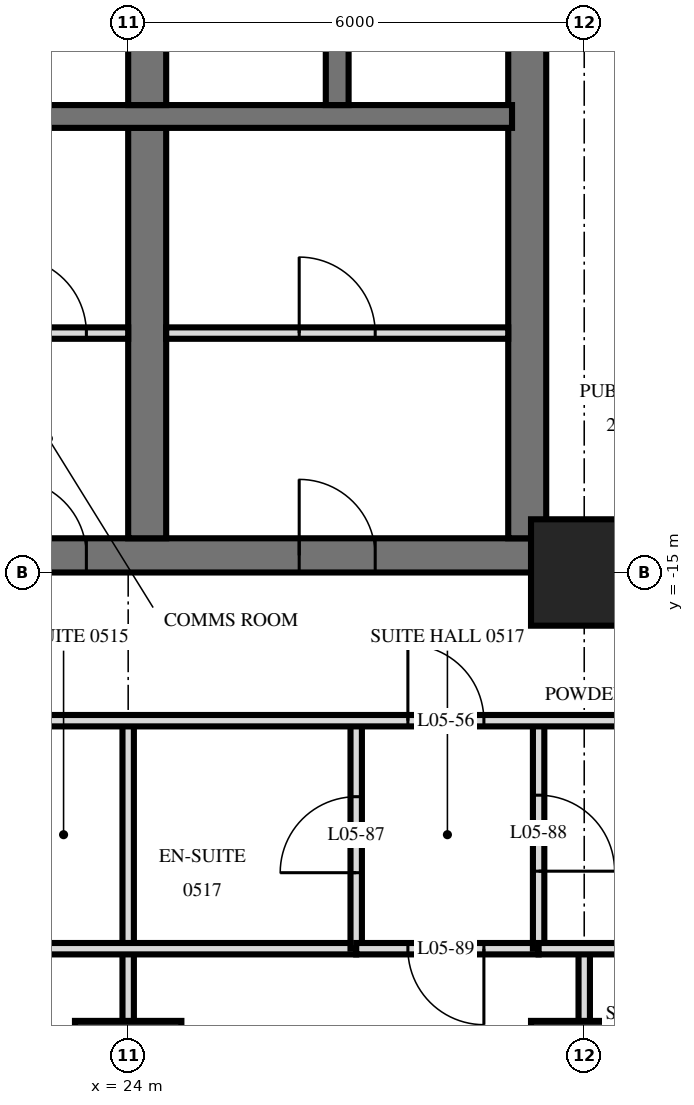
"""IFC4 building model, lengths in metres.
Left out: names, types, materials, properties, quantities, classifications, styles, units other than length and angle.
Written with IfcOpenShell. Run it as: python <this file> out.ifc"""

import sys

from ifc_helpers import new_model, si_unit, direction, frame, frame_2d, origin, origin_2d, place, context, subcontext, project, spatial, rectangle, extrude, element, fill, save


model = new_model("IFC4")
c1 = context("Model", 3, precision=1e-05, world=origin(), true_north=direction((0.0, 1.0)))
c2 = subcontext(c1, "Body", "Model", "MODEL_VIEW")
j1 = project(units=[si_unit("LENGTHUNIT", "METRE"), si_unit("PLANEANGLEUNIT", "RADIAN")], contexts=[c1])
p1 = place(None, origin())
s1 = spatial("IfcSite", under=j1, at=p1, CompositionType="ELEMENT")
p2 = place(p1, origin())
s2 = spatial("IfcBuilding", under=s1, at=p2, CompositionType="ELEMENT")
p3 = place(p2, frame((0.0, 0.0, 27.6)))
s3 = spatial("IfcBuildingStorey", under=s2, at=p3, CompositionType="ELEMENT", Elevation=27.6)
for number, where, z_axis, x_axis in (
    (1, (24.0, -21.6, 0.0), (0.0, 0.0, 1.0), (1.0, 0.0, 0.0)),
    (2, (30.0, -21.6, 0.0), (0.0, 0.0, 1.0), (1.0, 0.0, 0.0)),
    (3, (30.0, -15.0, 0.0), (0.0, 0.0, 1.0), (1.0, 0.0, 0.0)),
):
    element("IfcColumn", number, at=place(p3, frame(where, z_axis=z_axis, x_axis=x_axis)), inside=s3, PredefinedType="COLUMN", context=c2, shape_type="SweptSolid", body=[
        extrude(rectangle(XDim=1.4, YDim=1.4, at=origin_2d()), origin(), (0.0, 0.0, 1.0), 3.6),
    ])
p4 = place(p3, frame((10.0, -14.775, 0.0), z_axis=(0.0, 0.0, 1.0), x_axis=(1.0, 0.0, 0.0)))
e4 = element("IfcWall", 4, at=p4, inside=s3, PredefinedType="SHEAR", context=c2, shape_type="SweptSolid", body=[
    extrude(rectangle(XDim=19.5, YDim=0.45, at=frame_2d((9.75, 0.0))), origin(), (0.0, 0.0, 1.0), 3.6),
])
p5 = place(p4, frame((7.1, 0.0, 0.0)))
e5 = element("IfcOpeningElement", 5, at=p5, cuts=e4, PredefinedType="OPENING", context=c2, shape_type="SweptSolid", body=[
    extrude(rectangle(XDim=1.2, YDim=2.1, at=frame_2d((0.6, 1.05))), frame((0.0, 0.235, 0.0), z_axis=(0.0, -1.0, 0.0), x_axis=(1.0, 0.0, 0.0)), (0.0, 0.0, 1.0), 0.47),
])
p6 = place(p4, frame((4.15, 0.0, 0.0)))
e6 = element("IfcOpeningElement", 6, at=p6, cuts=e4, PredefinedType="OPENING", context=c2, shape_type="SweptSolid", body=[
    extrude(rectangle(XDim=1.1, YDim=2.1, at=frame_2d((0.55, 1.05))), frame((0.0, 0.235, 0.0), z_axis=(0.0, -1.0, 0.0), x_axis=(1.0, 0.0, 0.0)), (0.0, 0.0, 1.0), 0.47),
])
p7 = place(p4, frame((10.1, 0.0, 0.0)))
e7 = element("IfcOpeningElement", 7, at=p7, cuts=e4, PredefinedType="OPENING", context=c2, shape_type="SweptSolid", body=[
    extrude(rectangle(XDim=0.9, YDim=2.1, at=frame_2d((0.45, 1.05))), frame((0.0, 0.235, 0.0), z_axis=(0.0, -1.0, 0.0), x_axis=(1.0, 0.0, 0.0)), (0.0, 0.0, 1.0), 0.47),
])
p8 = place(p4, frame((12.45, 0.0, 0.0)))
e8 = element("IfcOpeningElement", 8, at=p8, cuts=e4, PredefinedType="OPENING", context=c2, shape_type="SweptSolid", body=[
    extrude(rectangle(XDim=1.0, YDim=2.1, at=frame_2d((0.5, 1.05))), frame((0.0, 0.235, 0.0), z_axis=(0.0, -1.0, 0.0), x_axis=(1.0, 0.0, 0.0)), (0.0, 0.0, 1.0), 0.47),
])
p9 = place(p4, frame((16.25, 0.0, 0.0)))
e9 = element("IfcOpeningElement", 9, at=p9, cuts=e4, PredefinedType="OPENING", context=c2, shape_type="SweptSolid", body=[
    extrude(rectangle(XDim=1.0, YDim=2.1, at=frame_2d((0.5, 1.05))), frame((0.0, 0.235, 0.0), z_axis=(0.0, -1.0, 0.0), x_axis=(1.0, 0.0, 0.0)), (0.0, 0.0, 1.0), 0.47),
])
p10 = place(p3, frame((29.25, -14.55, 0.0), z_axis=(0.0, 0.0, 1.0), x_axis=(0.0, 1.0, 0.0)))
e10 = element("IfcWall", 10, at=p10, inside=s3, PredefinedType="SHEAR", context=c2, shape_type="SweptSolid", body=[
    extrude(rectangle(XDim=14.1, YDim=0.5, at=frame_2d((7.05, 0.0))), origin(), (0.0, 0.0, 1.0), 3.6),
])
p11 = place(p3, frame((10.35, -9.0, 0.0), z_axis=(0.0, 0.0, 1.0), x_axis=(1.0, 0.0, 0.0)))
e11 = element("IfcWall", 11, at=p11, inside=s3, PredefinedType="SHEAR", context=c2, shape_type="SweptSolid", body=[
    extrude(rectangle(XDim=18.7, YDim=0.3, at=frame_2d((9.35, 0.0))), origin(), (0.0, 0.0, 1.0), 3.6),
])
p12 = place(p11, frame((3.8, 0.0, 0.0)))
e12 = element("IfcOpeningElement", 12, at=p12, cuts=e11, PredefinedType="OPENING", context=c2, shape_type="SweptSolid", body=[
    extrude(rectangle(XDim=1.1, YDim=2.1, at=frame_2d((0.55, 1.05))), frame((0.0, 0.16, 0.0), z_axis=(0.0, -1.0, 0.0), x_axis=(1.0, 0.0, 0.0)), (0.0, 0.0, 1.0), 0.32),
])
p13 = place(p3, frame((24.25, -8.85, 0.0), z_axis=(0.0, 0.0, 1.0), x_axis=(0.0, 1.0, 0.0)))
e13 = element("IfcWall", 13, at=p13, inside=s3, PredefinedType="SHEAR", context=c2, shape_type="SweptSolid", body=[
    extrude(rectangle(XDim=2.3, YDim=0.5, at=frame_2d((1.15, 0.0))), origin(), (0.0, 0.0, 1.0), 3.6),
])
p14 = place(p3, frame((24.25, -14.55, 0.0), z_axis=(0.0, 0.0, 1.0), x_axis=(0.0, 1.0, 0.0)))
e14 = element("IfcWall", 14, at=p14, inside=s3, PredefinedType="SHEAR", context=c2, shape_type="SweptSolid", body=[
    extrude(rectangle(XDim=5.4, YDim=0.5, at=frame_2d((2.7, 0.0))), origin(), (0.0, 0.0, 1.0), 3.6),
])
p15 = place(p3, frame((26.75, -8.85, 0.0), z_axis=(0.0, 0.0, 1.0), x_axis=(0.0, 1.0, 0.0)))
e15 = element("IfcWall", 15, at=p15, inside=s3, PredefinedType="SHEAR", context=c2, shape_type="SweptSolid", body=[
    extrude(rectangle(XDim=2.3, YDim=0.3, at=frame_2d((1.15, 0.0))), origin(), (0.0, 0.0, 1.0), 3.6),
])
p16 = place(p3, frame((21.9, -11.85, 0.0), z_axis=(0.0, 0.0, 1.0), x_axis=(1.0, 0.0, 0.0)))
e16 = element("IfcWall", 16, at=p16, inside=s3, PredefinedType="PARTITIONING", context=c2, shape_type="SweptSolid", body=[
    extrude(rectangle(XDim=2.1, YDim=0.15, at=frame_2d((1.05, 0.0))), origin(), (0.0, 0.0, 1.0), 3.3),
])
p17 = place(p16, frame((0.55, 0.0, 0.0)))
e17 = element("IfcOpeningElement", 17, at=p17, cuts=e16, PredefinedType="OPENING", context=c2, shape_type="SweptSolid", body=[
    extrude(rectangle(XDim=1.0, YDim=2.1, at=frame_2d((0.5, 1.05))), frame((0.0, 0.085, 0.0), z_axis=(0.0, -1.0, 0.0), x_axis=(1.0, 0.0, 0.0)), (0.0, 0.0, 1.0), 0.17),
])
p18 = place(p3, frame((24.5, -11.85, 0.0), z_axis=(0.0, 0.0, 1.0), x_axis=(1.0, 0.0, 0.0)))
e18 = element("IfcWall", 18, at=p18, inside=s3, PredefinedType="PARTITIONING", context=c2, shape_type="SweptSolid", body=[
    extrude(rectangle(XDim=4.5, YDim=0.15, at=frame_2d((2.25, 0.0))), origin(), (0.0, 0.0, 1.0), 3.3),
])
p19 = place(p18, frame((1.75, 0.0, 0.0)))
e19 = element("IfcOpeningElement", 19, at=p19, cuts=e18, PredefinedType="OPENING", context=c2, shape_type="SweptSolid", body=[
    extrude(rectangle(XDim=1.0, YDim=2.1, at=frame_2d((0.5, 1.05))), frame((0.0, 0.085, 0.0), z_axis=(0.0, -1.0, 0.0), x_axis=(1.0, 0.0, 0.0)), (0.0, 0.0, 1.0), 0.17),
])
p20 = place(p3, frame((30.0, -28.978, 0.0), z_axis=(0.0, 0.0, 1.0), x_axis=(0.0, 1.0, 0.0)))
e20 = element("IfcWall", 20, at=p20, inside=s3, PredefinedType="PARTITIONING", context=c2, shape_type="SweptSolid", body=[
    extrude(rectangle(XDim=9.028, YDim=0.15, at=frame_2d((4.514, 0.0))), origin(), (0.0, 0.0, 1.0), 3.32),
])
p21 = place(p20, frame((3.958, 0.0, 0.0)))
e21 = element("IfcOpeningElement", 21, at=p21, cuts=e20, PredefinedType="OPENING", context=c2, shape_type="SweptSolid", body=[
    extrude(rectangle(XDim=0.9, YDim=2.1, at=frame_2d((0.45, 1.05))), frame((0.0, 0.085, 0.0), z_axis=(0.0, -1.0, 0.0), x_axis=(1.0, 0.0, 0.0)), (0.0, 0.0, 1.0), 0.17),
])
p22 = place(p3, frame((29.4, -19.95, 0.0), z_axis=(0.0, 0.0, 1.0), x_axis=(0.0, 1.0, 0.0)))
e22 = element("IfcWall", 22, at=p22, inside=s3, PredefinedType="PARTITIONING", context=c2, shape_type="SweptSolid", body=[
    extrude(rectangle(XDim=3.0, YDim=0.15, at=frame_2d((1.5, 0.0))), origin(), (0.0, 0.0, 1.0), 3.32),
])
p23 = place(p22, frame((1.02, 0.0, 0.0)))
e23 = element("IfcOpeningElement", 23, at=p23, cuts=e22, PredefinedType="OPENING", context=c2, shape_type="SweptSolid", body=[
    extrude(rectangle(XDim=1.0, YDim=2.1, at=frame_2d((0.5, 1.05))), frame((0.0, 0.085, 0.0), z_axis=(0.0, -1.0, 0.0), x_axis=(1.0, 0.0, 0.0)), (0.0, 0.0, 1.0), 0.17),
])
p24 = place(p3, frame((27.0, -19.95, 0.0), z_axis=(0.0, 0.0, 1.0), x_axis=(0.0, 1.0, 0.0)))
e24 = element("IfcWall", 24, at=p24, inside=s3, PredefinedType="PARTITIONING", context=c2, shape_type="SweptSolid", body=[
    extrude(rectangle(XDim=3.0, YDim=0.15, at=frame_2d((1.5, 0.0))), origin(), (0.0, 0.0, 1.0), 3.32),
])
p25 = place(p24, frame((1.0, 0.0, 0.0)))
e25 = element("IfcOpeningElement", 25, at=p25, cuts=e24, PredefinedType="OPENING", context=c2, shape_type="SweptSolid", body=[
    extrude(rectangle(XDim=1.0, YDim=2.1, at=frame_2d((0.5, 1.05))), frame((0.0, 0.085, 0.0), z_axis=(0.0, -1.0, 0.0), x_axis=(1.0, 0.0, 0.0)), (0.0, 0.0, 1.0), 0.17),
])
p26 = place(p3, frame((24.0, -29.22, 0.0), z_axis=(0.0, 0.0, 1.0), x_axis=(0.0, 1.0, 0.0)))
e26 = element("IfcWall", 26, at=p26, inside=s3, PredefinedType="PARTITIONING", context=c2, shape_type="SweptSolid", body=[
    extrude(rectangle(XDim=12.27, YDim=0.15, at=frame_2d((6.135, 0.0))), origin(), (0.0, 0.0, 1.0), 3.32),
])
p27 = place(p3, frame((27.0, -19.95, 0.0), z_axis=(0.0, 0.0, 1.0), x_axis=(1.0, 0.0, 0.0)))
e27 = element("IfcWall", 27, at=p27, inside=s3, PredefinedType="PARTITIONING", context=c2, shape_type="SweptSolid", body=[
    extrude(rectangle(XDim=2.4, YDim=0.15, at=frame_2d((1.2, 0.0))), origin(), (0.0, 0.0, 1.0), 3.32),
])
p28 = place(p27, frame((0.68, 0.0, 0.0)))
e28 = element("IfcOpeningElement", 28, at=p28, cuts=e27, PredefinedType="OPENING", context=c2, shape_type="SweptSolid", body=[
    extrude(rectangle(XDim=1.0, YDim=2.1, at=frame_2d((0.5, 1.05))), frame((0.0, 0.085, 0.0), z_axis=(0.0, -1.0, 0.0), x_axis=(1.0, 0.0, 0.0)), (0.0, 0.0, 1.0), 0.17),
])
p29 = place(p3, frame((22.3, -19.95, 0.0), z_axis=(0.0, 0.0, 1.0), x_axis=(1.0, 0.0, 0.0)))
e29 = element("IfcWall", 29, at=p29, inside=s3, PredefinedType="PARTITIONING", context=c2, shape_type="SweptSolid", body=[
    extrude(rectangle(XDim=4.7, YDim=0.15, at=frame_2d((2.35, 0.0))), origin(), (0.0, 0.0, 1.0), 3.32),
])
p30 = place(p3, frame((29.4, -19.95, 0.0), z_axis=(0.0, 0.0, 1.0), x_axis=(1.0, 0.0, 0.0)))
e30 = element("IfcWall", 30, at=p30, inside=s3, PredefinedType="PARTITIONING", context=c2, shape_type="SweptSolid", body=[
    extrude(rectangle(XDim=2.4, YDim=0.15, at=frame_2d((1.2, 0.0))), origin(), (0.0, 0.0, 1.0), 3.32),
])
p31 = place(p3, frame((-33.12, -16.95, 0.0), z_axis=(0.0, 0.0, 1.0), x_axis=(1.0, 0.0, 0.0)))
e31 = element("IfcWall", 31, at=p31, inside=s3, PredefinedType="PARTITIONING", context=c2, shape_type="SweptSolid", body=[
    extrude(rectangle(XDim=66.24, YDim=0.15, at=frame_2d((33.12, 0.0))), origin(), (0.0, 0.0, 1.0), 3.32),
])
p32 = place(p31, frame((9.27, 0.0, 0.0)))
e32 = element("IfcOpeningElement", 32, at=p32, cuts=e31, PredefinedType="OPENING", context=c2, shape_type="SweptSolid", body=[
    extrude(rectangle(XDim=1.0, YDim=2.1, at=frame_2d((0.5, 1.05))), frame((0.0, 0.085, 0.0), z_axis=(0.0, -1.0, 0.0), x_axis=(1.0, 0.0, 0.0)), (0.0, 0.0, 1.0), 0.17),
])
p33 = place(p31, frame((13.97, 0.0, 0.0)))
e33 = element("IfcOpeningElement", 33, at=p33, cuts=e31, PredefinedType="OPENING", context=c2, shape_type="SweptSolid", body=[
    extrude(rectangle(XDim=1.0, YDim=2.1, at=frame_2d((0.5, 1.05))), frame((0.0, 0.085, 0.0), z_axis=(0.0, -1.0, 0.0), x_axis=(1.0, 0.0, 0.0)), (0.0, 0.0, 1.0), 0.17),
])
p34 = place(p31, frame((15.27, 0.0, 0.0)))
e34 = element("IfcOpeningElement", 34, at=p34, cuts=e31, PredefinedType="OPENING", context=c2, shape_type="SweptSolid", body=[
    extrude(rectangle(XDim=1.0, YDim=2.1, at=frame_2d((0.5, 1.05))), frame((0.0, 0.085, 0.0), z_axis=(0.0, -1.0, 0.0), x_axis=(1.0, 0.0, 0.0)), (0.0, 0.0, 1.0), 0.17),
])
p35 = place(p31, frame((19.97, 0.0, 0.0)))
e35 = element("IfcOpeningElement", 35, at=p35, cuts=e31, PredefinedType="OPENING", context=c2, shape_type="SweptSolid", body=[
    extrude(rectangle(XDim=1.0, YDim=2.1, at=frame_2d((0.5, 1.05))), frame((0.0, 0.085, 0.0), z_axis=(0.0, -1.0, 0.0), x_axis=(1.0, 0.0, 0.0)), (0.0, 0.0, 1.0), 0.17),
])
p36 = place(p31, frame((22.27, 0.0, 0.0)))
e36 = element("IfcOpeningElement", 36, at=p36, cuts=e31, PredefinedType="OPENING", context=c2, shape_type="SweptSolid", body=[
    extrude(rectangle(XDim=1.0, YDim=2.1, at=frame_2d((0.5, 1.05))), frame((0.0, 0.085, 0.0), z_axis=(0.0, -1.0, 0.0), x_axis=(1.0, 0.0, 0.0)), (0.0, 0.0, 1.0), 0.17),
])
p37 = place(p31, frame((28.97, 0.0, 0.0)))
e37 = element("IfcOpeningElement", 37, at=p37, cuts=e31, PredefinedType="OPENING", context=c2, shape_type="SweptSolid", body=[
    extrude(rectangle(XDim=1.0, YDim=2.1, at=frame_2d((0.5, 1.05))), frame((0.0, 0.085, 0.0), z_axis=(0.0, -1.0, 0.0), x_axis=(1.0, 0.0, 0.0)), (0.0, 0.0, 1.0), 0.17),
])
p38 = place(p31, frame((30.27, 0.0, 0.0)))
e38 = element("IfcOpeningElement", 38, at=p38, cuts=e31, PredefinedType="OPENING", context=c2, shape_type="SweptSolid", body=[
    extrude(rectangle(XDim=1.0, YDim=2.1, at=frame_2d((0.5, 1.05))), frame((0.0, 0.085, 0.0), z_axis=(0.0, -1.0, 0.0), x_axis=(1.0, 0.0, 0.0)), (0.0, 0.0, 1.0), 0.17),
])
p39 = place(p31, frame((34.97, 0.0, 0.0)))
e39 = element("IfcOpeningElement", 39, at=p39, cuts=e31, PredefinedType="OPENING", context=c2, shape_type="SweptSolid", body=[
    extrude(rectangle(XDim=1.0, YDim=2.1, at=frame_2d((0.5, 1.05))), frame((0.0, 0.085, 0.0), z_axis=(0.0, -1.0, 0.0), x_axis=(1.0, 0.0, 0.0)), (0.0, 0.0, 1.0), 0.17),
])
p40 = place(p31, frame((36.27, 0.0, 0.0)))
e40 = element("IfcOpeningElement", 40, at=p40, cuts=e31, PredefinedType="OPENING", context=c2, shape_type="SweptSolid", body=[
    extrude(rectangle(XDim=1.0, YDim=2.1, at=frame_2d((0.5, 1.05))), frame((0.0, 0.085, 0.0), z_axis=(0.0, -1.0, 0.0), x_axis=(1.0, 0.0, 0.0)), (0.0, 0.0, 1.0), 0.17),
])
p41 = place(p31, frame((40.97, 0.0, 0.0)))
e41 = element("IfcOpeningElement", 41, at=p41, cuts=e31, PredefinedType="OPENING", context=c2, shape_type="SweptSolid", body=[
    extrude(rectangle(XDim=1.0, YDim=2.1, at=frame_2d((0.5, 1.05))), frame((0.0, 0.085, 0.0), z_axis=(0.0, -1.0, 0.0), x_axis=(1.0, 0.0, 0.0)), (0.0, 0.0, 1.0), 0.17),
])
p42 = place(p31, frame((42.27, 0.0, 0.0)))
e42 = element("IfcOpeningElement", 42, at=p42, cuts=e31, PredefinedType="OPENING", context=c2, shape_type="SweptSolid", body=[
    extrude(rectangle(XDim=1.0, YDim=2.1, at=frame_2d((0.5, 1.05))), frame((0.0, 0.085, 0.0), z_axis=(0.0, -1.0, 0.0), x_axis=(1.0, 0.0, 0.0)), (0.0, 0.0, 1.0), 0.17),
])
p43 = place(p31, frame((46.97, 0.0, 0.0)))
e43 = element("IfcOpeningElement", 43, at=p43, cuts=e31, PredefinedType="OPENING", context=c2, shape_type="SweptSolid", body=[
    extrude(rectangle(XDim=1.0, YDim=2.1, at=frame_2d((0.5, 1.05))), frame((0.0, 0.085, 0.0), z_axis=(0.0, -1.0, 0.0), x_axis=(1.0, 0.0, 0.0)), (0.0, 0.0, 1.0), 0.17),
])
p44 = place(p31, frame((48.27, 0.0, 0.0)))
e44 = element("IfcOpeningElement", 44, at=p44, cuts=e31, PredefinedType="OPENING", context=c2, shape_type="SweptSolid", body=[
    extrude(rectangle(XDim=1.0, YDim=2.1, at=frame_2d((0.5, 1.05))), frame((0.0, 0.085, 0.0), z_axis=(0.0, -1.0, 0.0), x_axis=(1.0, 0.0, 0.0)), (0.0, 0.0, 1.0), 0.17),
])
p45 = place(p31, frame((52.97, 0.0, 0.0)))
e45 = element("IfcOpeningElement", 45, at=p45, cuts=e31, PredefinedType="OPENING", context=c2, shape_type="SweptSolid", body=[
    extrude(rectangle(XDim=1.0, YDim=2.1, at=frame_2d((0.5, 1.05))), frame((0.0, 0.085, 0.0), z_axis=(0.0, -1.0, 0.0), x_axis=(1.0, 0.0, 0.0)), (0.0, 0.0, 1.0), 0.17),
])
p46 = place(p31, frame((54.27, 0.0, 0.0)))
e46 = element("IfcOpeningElement", 46, at=p46, cuts=e31, PredefinedType="OPENING", context=c2, shape_type="SweptSolid", body=[
    extrude(rectangle(XDim=1.0, YDim=2.1, at=frame_2d((0.5, 1.05))), frame((0.0, 0.085, 0.0), z_axis=(0.0, -1.0, 0.0), x_axis=(1.0, 0.0, 0.0)), (0.0, 0.0, 1.0), 0.17),
])
p47 = place(p31, frame((4.4, 0.0, 0.0)))
e47 = element("IfcOpeningElement", 47, at=p47, cuts=e31, PredefinedType="OPENING", context=c2, shape_type="SweptSolid", body=[
    extrude(rectangle(XDim=1.0, YDim=2.1, at=frame_2d((0.5, 1.05))), frame((0.0, 0.085, 0.0), z_axis=(0.0, -1.0, 0.0), x_axis=(1.0, 0.0, 0.0)), (0.0, 0.0, 1.0), 0.17),
])
p48 = place(p31, frame((60.8, 0.0, 0.0)))
e48 = element("IfcOpeningElement", 48, at=p48, cuts=e31, PredefinedType="OPENING", context=c2, shape_type="SweptSolid", body=[
    extrude(rectangle(XDim=1.0, YDim=2.1, at=frame_2d((0.5, 1.05))), frame((0.0, 0.085, 0.0), z_axis=(0.0, -1.0, 0.0), x_axis=(1.0, 0.0, 0.0)), (0.0, 0.0, 1.0), 0.17),
])
p49 = place(p3, frame((29.55, -15.0, 0.0), z_axis=(0.0, 0.0, 1.0), x_axis=(1.0, 0.0, 0.0)))
e49 = element("IfcWall", 49, at=p49, inside=s3, PredefinedType="PARTITIONING", context=c2, shape_type="SweptSolid", body=[
    extrude(rectangle(XDim=3.57, YDim=0.15, at=frame_2d((1.785, 0.0))), origin(), (0.0, 0.0, 1.0), 3.32),
])
p50 = place(p49, frame((1.205, 0.0, 0.0)))
e50 = element("IfcOpeningElement", 50, at=p50, cuts=e49, PredefinedType="OPENING", context=c2, shape_type="SweptSolid", body=[
    extrude(rectangle(XDim=0.8, YDim=2.1, at=frame_2d((0.4, 1.05))), frame((0.0, 0.085, 0.0), z_axis=(0.0, -1.0, 0.0), x_axis=(1.0, 0.0, 0.0)), (0.0, 0.0, 1.0), 0.17),
])
p51 = place(p8, origin())
e51 = element("IfcDoor", 51, at=p51, inside=s3, OperationType="SINGLE_SWING_RIGHT", PredefinedType="DOOR", context=c2, shape_type="SweptSolid", body=[
    extrude(rectangle(XDim=1.0, YDim=2.1, at=frame_2d((0.5, 1.05))), frame((0.0, 0.025, 0.0), z_axis=(0.0, -1.0, 0.0), x_axis=(1.0, 0.0, 0.0)), (0.0, 0.0, 1.0), 0.05),
])
fill(e8, e51)
p52 = place(p9, origin())
e52 = element("IfcDoor", 52, at=p52, inside=s3, OperationType="SINGLE_SWING_RIGHT", PredefinedType="DOOR", context=c2, shape_type="SweptSolid", body=[
    extrude(rectangle(XDim=1.0, YDim=2.1, at=frame_2d((0.5, 1.05))), frame((0.0, 0.025, 0.0), z_axis=(0.0, -1.0, 0.0), x_axis=(1.0, 0.0, 0.0)), (0.0, 0.0, 1.0), 0.05),
])
fill(e9, e52)
p53 = place(p17, origin())
e53 = element("IfcDoor", 53, at=p53, inside=s3, OperationType="SINGLE_SWING_RIGHT", PredefinedType="DOOR", context=c2, shape_type="SweptSolid", body=[
    extrude(rectangle(XDim=1.0, YDim=2.1, at=frame_2d((0.5, 1.05))), frame((0.0, 0.025, 0.0), z_axis=(0.0, -1.0, 0.0), x_axis=(1.0, 0.0, 0.0)), (0.0, 0.0, 1.0), 0.05),
])
fill(e17, e53)
p54 = place(p19, origin())
e54 = element("IfcDoor", 54, at=p54, inside=s3, OperationType="SINGLE_SWING_RIGHT", PredefinedType="DOOR", context=c2, shape_type="SweptSolid", body=[
    extrude(rectangle(XDim=1.0, YDim=2.1, at=frame_2d((0.5, 1.05))), frame((0.0, 0.025, 0.0), z_axis=(0.0, -1.0, 0.0), x_axis=(1.0, 0.0, 0.0)), (0.0, 0.0, 1.0), 0.05),
])
fill(e19, e54)
p55 = place(p48, origin())
e55 = element("IfcDoor", 55, at=p55, inside=s3, OperationType="SINGLE_SWING_RIGHT", PredefinedType="DOOR", context=c2, shape_type="SweptSolid", body=[
    extrude(rectangle(XDim=1.0, YDim=2.1, at=frame_2d((0.5, 1.05))), frame((0.0, 0.025, 0.0), z_axis=(0.0, -1.0, 0.0), x_axis=(1.0, 0.0, 0.0)), (0.0, 0.0, 1.0), 0.05),
])
fill(e48, e55)
p56 = place(p25, origin())
e56 = element("IfcDoor", 56, at=p56, inside=s3, OperationType="SINGLE_SWING_RIGHT", PredefinedType="DOOR", context=c2, shape_type="SweptSolid", body=[
    extrude(rectangle(XDim=1.0, YDim=2.1, at=frame_2d((0.5, 1.05))), frame((0.0, 0.025, 0.0), z_axis=(0.0, -1.0, 0.0), x_axis=(1.0, 0.0, 0.0)), (0.0, 0.0, 1.0), 0.05),
])
fill(e25, e56)
p57 = place(p23, frame((0.5, 0.0, 0.0), z_axis=(0.0, 0.0, 1.0), x_axis=(-1.0, 0.0, 0.0)))
e57 = element("IfcDoor", 57, at=p57, inside=s3, OperationType="SINGLE_SWING_LEFT", PredefinedType="DOOR", context=c2, shape_type="SweptSolid", body=[
    extrude(rectangle(XDim=1.0, YDim=2.1, at=frame_2d((0.0, 1.05))), frame((0.0, -0.025, 0.0), z_axis=(0.0, 1.0, 0.0), x_axis=(-1.0, 0.0, 0.0)), (0.0, 0.0, 1.0), 0.05),
])
fill(e23, e57)
p58 = place(p28, frame((0.5, 0.0, 0.0), z_axis=(0.0, 0.0, 1.0), x_axis=(-1.0, 0.0, 0.0)))
e58 = element("IfcDoor", 58, at=p58, inside=s3, OperationType="SINGLE_SWING_RIGHT", PredefinedType="DOOR", context=c2, shape_type="SweptSolid", body=[
    extrude(rectangle(XDim=1.0, YDim=2.1, at=frame_2d((0.0, 1.05))), frame((0.0, -0.025, 0.0), z_axis=(0.0, 1.0, 0.0), x_axis=(-1.0, 0.0, 0.0)), (0.0, 0.0, 1.0), 0.05),
])
fill(e28, e58)
save(model, sys.argv[1])
